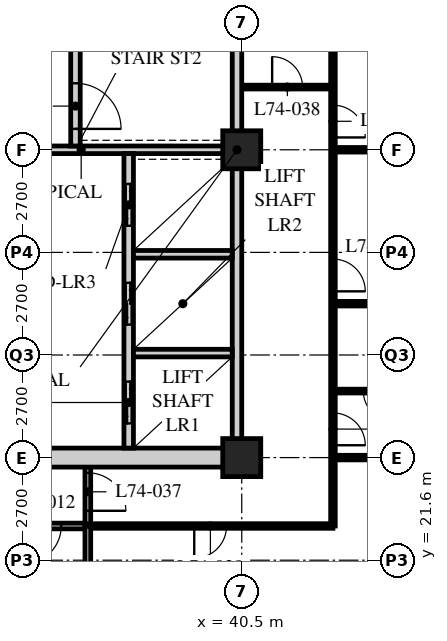
"""IFC4 building model, lengths in metres.
Left out: names, types, materials, properties, quantities, classifications, styles, units other than length and angle.
Written with IfcOpenShell. Run it as: python <this file> out.ifc"""

import sys

from ifc_helpers import new_model, si_unit, direction, frame, frame_2d, origin, origin_2d, place, context, subcontext, project, spatial, rectangle, hollow_rectangle, extrude, element, fill, save


model = new_model("IFC4")
c1 = context("Model", 3, precision=1e-05, world=origin(), true_north=direction((0.0, 1.0)))
c2 = subcontext(c1, "Body", "Model", "MODEL_VIEW")
j1 = project(units=[si_unit("LENGTHUNIT", "METRE"), si_unit("PLANEANGLEUNIT", "RADIAN")], contexts=[c1])
p1 = place(None, origin())
s1 = spatial("IfcSite", under=j1, at=p1, CompositionType="ELEMENT")
p2 = place(p1, origin())
s2 = spatial("IfcBuilding", under=s1, at=p2, CompositionType="ELEMENT")
p3 = place(p2, frame((0.0, 0.0, 289.2)))
s3 = spatial("IfcBuildingStorey", under=s2, at=p3, CompositionType="ELEMENT", Elevation=289.2)
for number, where, z_axis, x_axis in (
    (1, (40.5, 24.3, 0.0), (0.0, 0.0, 1.0), (1.0, 0.0, 0.0)),
    (2, (40.5, 32.4, 0.0), (0.0, 0.0, 1.0), (1.0, 0.0, 0.0)),
):
    element("IfcColumn", number, at=place(p3, frame(where, z_axis=z_axis, x_axis=x_axis)), inside=s3, PredefinedType="COLUMN", context=c2, shape_type="SweptSolid", body=[
        extrude(hollow_rectangle(XDim=1.0, YDim=1.0, WallThickness=0.1, at=origin_2d()), origin(), (0.0, 0.0, 1.0), 3.9),
    ])
p4 = place(p3, frame((12.15, 22.5, 0.0), z_axis=(0.0, 0.0, 1.0), x_axis=(1.0, 0.0, 0.0)))
e3 = element("IfcWall", 3, at=p4, inside=s3, PredefinedType="PARTITIONING", context=c2, shape_type="SweptSolid", body=[
    extrude(rectangle(XDim=24.3, YDim=0.15, at=frame_2d((12.15, 0.0))), origin(), (0.0, 0.0, 1.0), 3.69),
])
p5 = place(p4, frame((4.45, 0.0, 0.0)))
e4 = element("IfcOpeningElement", 4, at=p5, cuts=e3, PredefinedType="OPENING", context=c2, shape_type="SweptSolid", body=[
    extrude(rectangle(XDim=1.0, YDim=2.1, at=frame_2d((0.5, 1.05))), frame((0.0, 0.085, 0.0), z_axis=(0.0, -1.0, 0.0), x_axis=(1.0, 0.0, 0.0)), (0.0, 0.0, 1.0), 0.17),
])
p6 = place(p4, frame((22.6, 0.0, 0.0)))
e5 = element("IfcOpeningElement", 5, at=p6, cuts=e3, PredefinedType="OPENING", context=c2, shape_type="SweptSolid", body=[
    extrude(rectangle(XDim=1.0, YDim=2.1, at=frame_2d((0.5, 1.05))), frame((0.0, 0.085, 0.0), z_axis=(0.0, -1.0, 0.0), x_axis=(1.0, 0.0, 0.0)), (0.0, 0.0, 1.0), 0.17),
])
p7 = place(p4, frame((2.625, 0.0, 0.0)))
e6 = element("IfcOpeningElement", 6, at=p7, cuts=e3, PredefinedType="OPENING", context=c2, shape_type="SweptSolid", body=[
    extrude(rectangle(XDim=1.0, YDim=2.1, at=frame_2d((0.5, 1.05))), frame((0.0, 0.085, 0.0), z_axis=(0.0, -1.0, 0.0), x_axis=(1.0, 0.0, 0.0)), (0.0, 0.0, 1.0), 0.17),
])
p8 = place(p3, frame((36.45, 22.5, 0.0), z_axis=(0.0, 0.0, 1.0), x_axis=(0.0, 1.0, 0.0)))
e7 = element("IfcWall", 7, at=p8, inside=s3, PredefinedType="PARTITIONING", context=c2, shape_type="SweptSolid", body=[
    extrude(rectangle(XDim=1.8, YDim=0.15, at=frame_2d((0.9, 0.0))), origin(), (0.0, 0.0, 1.0), 3.69),
])
p9 = place(p8, frame((0.4, 0.0, 0.0)))
e8 = element("IfcOpeningElement", 8, at=p9, cuts=e7, PredefinedType="OPENING", context=c2, shape_type="SweptSolid", body=[
    extrude(rectangle(XDim=1.0, YDim=2.1, at=frame_2d((0.5, 1.05))), frame((0.0, 0.085, 0.0), z_axis=(0.0, -1.0, 0.0), x_axis=(1.0, 0.0, 0.0)), (0.0, 0.0, 1.0), 0.17),
])
p10 = place(p3, frame((40.5, 34.05, 0.0), z_axis=(0.0, 0.0, 1.0), x_axis=(1.0, 0.0, 0.0)))
e9 = element("IfcWall", 9, at=p10, inside=s3, PredefinedType="PARTITIONING", context=c2, shape_type="SweptSolid", body=[
    extrude(rectangle(XDim=2.4, YDim=0.1, at=frame_2d((1.2, 0.0))), origin(), (0.0, 0.0, 1.0), 3.69),
])
p11 = place(p10, frame((0.8, 0.0, 0.0)))
e10 = element("IfcOpeningElement", 10, at=p11, cuts=e9, PredefinedType="OPENING", context=c2, shape_type="SweptSolid", body=[
    extrude(rectangle(XDim=0.8, YDim=2.1, at=frame_2d((0.4, 1.05))), frame((0.0, 0.06, 0.0), z_axis=(0.0, -1.0, 0.0), x_axis=(1.0, 0.0, 0.0)), (0.0, 0.0, 1.0), 0.12),
])
p12 = place(p3, frame((42.9, 22.5, 0.0), z_axis=(0.0, 0.0, 1.0), x_axis=(0.0, 1.0, 0.0)))
e11 = element("IfcWall", 11, at=p12, inside=s3, PredefinedType="PARTITIONING", context=c2, shape_type="SweptSolid", body=[
    extrude(rectangle(XDim=13.95, YDim=0.12, at=frame_2d((6.975, 0.0))), origin(), (0.0, 0.0, 1.0), 3.69),
])
p13 = place(p12, frame((2.125, 0.0, 0.0)))
e12 = element("IfcOpeningElement", 12, at=p13, cuts=e11, PredefinedType="OPENING", context=c2, shape_type="SweptSolid", body=[
    extrude(rectangle(XDim=0.85, YDim=2.1, at=frame_2d((0.425, 1.05))), frame((0.0, 0.07, 0.0), z_axis=(0.0, -1.0, 0.0), x_axis=(1.0, 0.0, 0.0)), (0.0, 0.0, 1.0), 0.14),
])
p14 = place(p12, frame((6.175, 0.0, 0.0)))
e13 = element("IfcOpeningElement", 13, at=p14, cuts=e11, PredefinedType="OPENING", context=c2, shape_type="SweptSolid", body=[
    extrude(rectangle(XDim=0.85, YDim=2.1, at=frame_2d((0.425, 1.05))), frame((0.0, 0.07, 0.0), z_axis=(0.0, -1.0, 0.0), x_axis=(1.0, 0.0, 0.0)), (0.0, 0.0, 1.0), 0.14),
])
p15 = place(p12, frame((10.225, 0.0, 0.0)))
e14 = element("IfcOpeningElement", 14, at=p15, cuts=e11, PredefinedType="OPENING", context=c2, shape_type="SweptSolid", body=[
    extrude(rectangle(XDim=0.85, YDim=2.1, at=frame_2d((0.425, 1.05))), frame((0.0, 0.07, 0.0), z_axis=(0.0, -1.0, 0.0), x_axis=(1.0, 0.0, 0.0)), (0.0, 0.0, 1.0), 0.14),
])
p16 = place(p3, frame((36.45, 22.5, 0.0), z_axis=(0.0, 0.0, 1.0), x_axis=(1.0, 0.0, 0.0)))
e15 = element("IfcWall", 15, at=p16, inside=s3, PredefinedType="PARTITIONING", context=c2, shape_type="SweptSolid", body=[
    extrude(rectangle(XDim=6.45, YDim=0.12, at=frame_2d((3.225, 0.0))), origin(), (0.0, 0.0, 1.0), 3.69),
])
p17 = place(p16, frame((2.8, 0.0, 0.0)))
e16 = element("IfcOpeningElement", 16, at=p17, cuts=e15, PredefinedType="OPENING", context=c2, shape_type="SweptSolid", body=[
    extrude(rectangle(XDim=0.85, YDim=2.1, at=frame_2d((0.425, 1.05))), frame((0.0, 0.07, 0.0), z_axis=(0.0, -1.0, 0.0), x_axis=(1.0, 0.0, 0.0)), (0.0, 0.0, 1.0), 0.14),
])
p18 = place(p3, frame((42.9, 24.3, 0.0), z_axis=(0.0, 0.0, 1.0), x_axis=(1.0, 0.0, 0.0)))
e17 = element("IfcWall", 17, at=p18, inside=s3, PredefinedType="PARTITIONING", context=c2, shape_type="SweptSolid", body=[
    extrude(rectangle(XDim=9.45, YDim=0.12, at=frame_2d((4.725, 0.0))), origin(), (0.0, 0.0, 1.0), 3.078),
])
p19 = place(p3, frame((36.45, 16.5, 0.0), z_axis=(0.0, 0.0, 1.0), x_axis=(0.0, 1.0, 0.0)))
e18 = element("IfcWall", 18, at=p19, inside=s3, PredefinedType="PARTITIONING", context=c2, shape_type="SweptSolid", body=[
    extrude(rectangle(XDim=6.0, YDim=0.15, at=frame_2d((3.0, 0.0))), origin(), (0.0, 0.0, 1.0), 3.69),
])
p20 = place(p3, frame((42.9, 26.05, 0.0), z_axis=(0.0, 0.0, 1.0), x_axis=(1.0, 0.0, 0.0)))
e19 = element("IfcWall", 19, at=p20, inside=s3, PredefinedType="PARTITIONING", context=c2, shape_type="SweptSolid", body=[
    extrude(rectangle(XDim=2.4, YDim=0.1, at=frame_2d((1.2, 0.0))), origin(), (0.0, 0.0, 1.0), 3.69),
])
p21 = place(p20, frame((0.8, 0.0, 0.0)))
e20 = element("IfcOpeningElement", 20, at=p21, cuts=e19, PredefinedType="OPENING", context=c2, shape_type="SweptSolid", body=[
    extrude(rectangle(XDim=0.8, YDim=2.1, at=frame_2d((0.4, 1.05))), frame((0.0, 0.06, 0.0), z_axis=(0.0, -1.0, 0.0), x_axis=(1.0, 0.0, 0.0)), (0.0, 0.0, 1.0), 0.12),
])
p22 = place(p3, frame((42.9, 28.35, 0.0), z_axis=(0.0, 0.0, 1.0), x_axis=(1.0, 0.0, 0.0)))
e21 = element("IfcWall", 21, at=p22, inside=s3, PredefinedType="PARTITIONING", context=c2, shape_type="SweptSolid", body=[
    extrude(rectangle(XDim=13.5, YDim=0.12, at=frame_2d((6.75, 0.0))), origin(), (0.0, 0.0, 1.0), 3.69),
])
p23 = place(p3, frame((42.9, 32.4, 0.0), z_axis=(0.0, 0.0, 1.0), x_axis=(1.0, 0.0, 0.0)))
e22 = element("IfcWall", 22, at=p23, inside=s3, PredefinedType="PARTITIONING", context=c2, shape_type="SweptSolid", body=[
    extrude(rectangle(XDim=13.5, YDim=0.12, at=frame_2d((6.75, 0.0))), origin(), (0.0, 0.0, 1.0), 3.078),
])
p24 = place(p3, frame((15.95, 24.3, 0.0), z_axis=(0.0, 0.0, 1.0), x_axis=(1.0, 0.0, 0.0)))
e23 = element("IfcWall", 23, at=p24, inside=s3, PredefinedType="SOLIDWALL", context=c2, shape_type="SweptSolid", body=[
    extrude(rectangle(XDim=24.55, YDim=0.5, at=frame_2d((12.275, 0.0))), origin(), (0.0, 0.0, 1.0), 3.04),
])
p25 = place(p24, frame((11.5, 0.0, 0.0)))
e24 = element("IfcOpeningElement", 24, at=p25, cuts=e23, PredefinedType="OPENING", context=c2, shape_type="SweptSolid", body=[
    extrude(rectangle(XDim=1.8, YDim=2.4, at=frame_2d((0.9, 1.2))), frame((0.0, 0.26, 0.0), z_axis=(0.0, -1.0, 0.0), x_axis=(1.0, 0.0, 0.0)), (0.0, 0.0, 1.0), 0.52),
])
p26 = place(p3, frame((40.375, 24.55, 0.0), z_axis=(0.0, 0.0, 1.0), x_axis=(0.0, 1.0, 0.0)))
e25 = element("IfcWall", 25, at=p26, inside=s3, PredefinedType="SOLIDWALL", context=c2, shape_type="SweptSolid", body=[
    extrude(rectangle(XDim=15.7, YDim=0.25, at=frame_2d((7.85, 0.0))), origin(), (0.0, 0.0, 1.0), 3.078),
])
p27 = place(p3, frame((32.3, 32.4, 0.0), z_axis=(0.0, 0.0, 1.0), x_axis=(1.0, 0.0, 0.0)))
e26 = element("IfcWall", 26, at=p27, inside=s3, PredefinedType="SOLIDWALL", context=c2, shape_type="SweptSolid", body=[
    extrude(rectangle(XDim=7.95, YDim=0.2, at=frame_2d((3.975, 0.0))), origin(), (0.0, 0.0, 1.0), 3.078),
])
p28 = place(p3, frame((37.525, 24.55, 0.0), z_axis=(0.0, 0.0, 1.0), x_axis=(0.0, 1.0, 0.0)))
e27 = element("IfcWall", 27, at=p28, inside=s3, PredefinedType="SOLIDWALL", context=c2, shape_type="SweptSolid", body=[
    extrude(rectangle(XDim=7.75, YDim=0.25, at=frame_2d((3.875, 0.0))), origin(), (0.0, 0.0, 1.0), 3.69),
])
p29 = place(p28, frame((0.65, 0.0, 0.0)))
e28 = element("IfcOpeningElement", 28, at=p29, cuts=e27, PredefinedType="OPENING", context=c2, shape_type="SweptSolid", body=[
    extrude(rectangle(XDim=1.1, YDim=2.4, at=frame_2d((0.55, 1.2))), frame((0.0, 0.135, 0.0), z_axis=(0.0, -1.0, 0.0), x_axis=(1.0, 0.0, 0.0)), (0.0, 0.0, 1.0), 0.27),
])
p30 = place(p28, frame((3.25, 0.0, 0.0)))
e29 = element("IfcOpeningElement", 29, at=p30, cuts=e27, PredefinedType="OPENING", context=c2, shape_type="SweptSolid", body=[
    extrude(rectangle(XDim=1.1, YDim=2.4, at=frame_2d((0.55, 1.2))), frame((0.0, 0.135, 0.0), z_axis=(0.0, -1.0, 0.0), x_axis=(1.0, 0.0, 0.0)), (0.0, 0.0, 1.0), 0.27),
])
p31 = place(p28, frame((5.85, 0.0, 0.0)))
e30 = element("IfcOpeningElement", 30, at=p31, cuts=e27, PredefinedType="OPENING", context=c2, shape_type="SweptSolid", body=[
    extrude(rectangle(XDim=1.1, YDim=2.4, at=frame_2d((0.55, 1.2))), frame((0.0, 0.135, 0.0), z_axis=(0.0, -1.0, 0.0), x_axis=(1.0, 0.0, 0.0)), (0.0, 0.0, 1.0), 0.27),
])
for number, where, z_axis, x_axis in (
    (31, (37.65, 27.05, 0.0), (0.0, 0.0, 1.0), (1.0, 0.0, 0.0)),
    (32, (37.65, 29.65, 0.0), (0.0, 0.0, 1.0), (1.0, 0.0, 0.0)),
):
    element("IfcWall", number, at=place(p3, frame(where, z_axis=z_axis, x_axis=x_axis)), inside=s3, PredefinedType="SOLIDWALL", context=c2, shape_type="SweptSolid", body=[
        extrude(rectangle(XDim=2.6, YDim=0.2, at=frame_2d((1.3, 0.0))), origin(), (0.0, 0.0, 1.0), 3.69),
    ])
p32 = place(p3, frame((36.125, 32.5, 0.0), z_axis=(0.0, 0.0, 1.0), x_axis=(0.0, 1.0, 0.0)))
e33 = element("IfcWall", 33, at=p32, inside=s3, PredefinedType="SOLIDWALL", context=c2, shape_type="SweptSolid", body=[
    extrude(rectangle(XDim=7.75, YDim=0.25, at=frame_2d((3.875, 0.0))), origin(), (0.0, 0.0, 1.0), 3.69),
])
p33 = place(p32, frame((0.45, 0.0, 0.0)))
e34 = element("IfcOpeningElement", 34, at=p33, cuts=e33, PredefinedType="OPENING", context=c2, shape_type="SweptSolid", body=[
    extrude(rectangle(XDim=1.2, YDim=2.1, at=frame_2d((0.6, 1.05))), frame((0.0, 0.135, 0.0), z_axis=(0.0, -1.0, 0.0), x_axis=(1.0, 0.0, 0.0)), (0.0, 0.0, 1.0), 0.27),
])
p34 = place(p6, origin())
e35 = element("IfcDoor", 35, at=p34, inside=s3, OperationType="SINGLE_SWING_RIGHT", PredefinedType="DOOR", context=c2, shape_type="SweptSolid", body=[
    extrude(rectangle(XDim=1.0, YDim=2.1, at=frame_2d((0.5, 1.05))), frame((0.0, 0.025, 0.0), z_axis=(0.0, -1.0, 0.0), x_axis=(1.0, 0.0, 0.0)), (0.0, 0.0, 1.0), 0.05),
])
fill(e5, e35)
p35 = place(p9, origin())
e36 = element("IfcDoor", 36, at=p35, inside=s3, OperationType="SINGLE_SWING_RIGHT", PredefinedType="DOOR", context=c2, shape_type="SweptSolid", body=[
    extrude(rectangle(XDim=1.0, YDim=2.1, at=frame_2d((0.5, 1.05))), frame((0.0, 0.025, 0.0), z_axis=(0.0, -1.0, 0.0), x_axis=(1.0, 0.0, 0.0)), (0.0, 0.0, 1.0), 0.05),
])
fill(e8, e36)
p36 = place(p11, origin())
e37 = element("IfcDoor", 37, at=p36, inside=s3, OperationType="SINGLE_SWING_LEFT", PredefinedType="DOOR", context=c2, shape_type="SweptSolid", body=[
    extrude(rectangle(XDim=0.8, YDim=2.1, at=frame_2d((0.4, 1.05))), frame((0.0, 0.025, 0.0), z_axis=(0.0, -1.0, 0.0), x_axis=(1.0, 0.0, 0.0)), (0.0, 0.0, 1.0), 0.05),
])
fill(e10, e37)
p37 = place(p17, origin())
e38 = element("IfcDoor", 38, at=p37, inside=s3, OperationType="SINGLE_SWING_RIGHT", PredefinedType="DOOR", context=c2, shape_type="SweptSolid", body=[
    extrude(rectangle(XDim=0.85, YDim=2.1, at=frame_2d((0.425, 1.05))), frame((0.0, 0.025, 0.0), z_axis=(0.0, -1.0, 0.0), x_axis=(1.0, 0.0, 0.0)), (0.0, 0.0, 1.0), 0.05),
])
fill(e16, e38)
p38 = place(p21, origin())
e39 = element("IfcDoor", 39, at=p38, inside=s3, OperationType="SINGLE_SWING_LEFT", PredefinedType="DOOR", context=c2, shape_type="SweptSolid", body=[
    extrude(rectangle(XDim=0.8, YDim=2.1, at=frame_2d((0.4, 1.05))), frame((0.0, 0.025, 0.0), z_axis=(0.0, -1.0, 0.0), x_axis=(1.0, 0.0, 0.0)), (0.0, 0.0, 1.0), 0.05),
])
fill(e20, e39)
p39 = place(p13, origin())
e40 = element("IfcDoor", 40, at=p39, inside=s3, OperationType="SINGLE_SWING_RIGHT", PredefinedType="DOOR", context=c2, shape_type="SweptSolid", body=[
    extrude(rectangle(XDim=0.85, YDim=2.1, at=frame_2d((0.425, 1.05))), frame((0.0, 0.025, 0.0), z_axis=(0.0, -1.0, 0.0), x_axis=(1.0, 0.0, 0.0)), (0.0, 0.0, 1.0), 0.05),
])
fill(e12, e40)
p40 = place(p14, origin())
e41 = element("IfcDoor", 41, at=p40, inside=s3, OperationType="SINGLE_SWING_RIGHT", PredefinedType="DOOR", context=c2, shape_type="SweptSolid", body=[
    extrude(rectangle(XDim=0.85, YDim=2.1, at=frame_2d((0.425, 1.05))), frame((0.0, 0.025, 0.0), z_axis=(0.0, -1.0, 0.0), x_axis=(1.0, 0.0, 0.0)), (0.0, 0.0, 1.0), 0.05),
])
fill(e13, e41)
p41 = place(p15, origin())
e42 = element("IfcDoor", 42, at=p41, inside=s3, OperationType="SINGLE_SWING_RIGHT", PredefinedType="DOOR", context=c2, shape_type="SweptSolid", body=[
    extrude(rectangle(XDim=0.85, YDim=2.1, at=frame_2d((0.425, 1.05))), frame((0.0, 0.025, 0.0), z_axis=(0.0, -1.0, 0.0), x_axis=(1.0, 0.0, 0.0)), (0.0, 0.0, 1.0), 0.05),
])
fill(e14, e42)
p42 = place(p33, origin())
e43 = element("IfcDoor", 43, at=p42, inside=s3, OperationType="SINGLE_SWING_RIGHT", PredefinedType="DOOR", context=c2, shape_type="SweptSolid", body=[
    extrude(rectangle(XDim=1.2, YDim=2.1, at=frame_2d((0.6, 1.05))), frame((0.0, 0.025, 0.0), z_axis=(0.0, -1.0, 0.0), x_axis=(1.0, 0.0, 0.0)), (0.0, 0.0, 1.0), 0.05),
])
fill(e34, e43)
p43 = place(p29, origin())
e44 = element("IfcDoor", 44, at=p43, inside=s3, OperationType="DOUBLE_DOOR_SLIDING", PredefinedType="DOOR", context=c2, shape_type="SweptSolid", body=[
    extrude(rectangle(XDim=1.1, YDim=2.4, at=frame_2d((0.55, 1.2))), frame((0.0, 0.025, 0.0), z_axis=(0.0, -1.0, 0.0), x_axis=(1.0, 0.0, 0.0)), (0.0, 0.0, 1.0), 0.05),
])
fill(e28, e44)
p44 = place(p30, origin())
e45 = element("IfcDoor", 45, at=p44, inside=s3, OperationType="DOUBLE_DOOR_SLIDING", PredefinedType="DOOR", context=c2, shape_type="SweptSolid", body=[
    extrude(rectangle(XDim=1.1, YDim=2.4, at=frame_2d((0.55, 1.2))), frame((0.0, 0.025, 0.0), z_axis=(0.0, -1.0, 0.0), x_axis=(1.0, 0.0, 0.0)), (0.0, 0.0, 1.0), 0.05),
])
fill(e29, e45)
p45 = place(p31, origin())
e46 = element("IfcDoor", 46, at=p45, inside=s3, OperationType="DOUBLE_DOOR_SLIDING", PredefinedType="DOOR", context=c2, shape_type="SweptSolid", body=[
    extrude(rectangle(XDim=1.1, YDim=2.4, at=frame_2d((0.55, 1.2))), frame((0.0, 0.025, 0.0), z_axis=(0.0, -1.0, 0.0), x_axis=(1.0, 0.0, 0.0)), (0.0, 0.0, 1.0), 0.05),
])
fill(e30, e46)
save(model, sys.argv[1])
